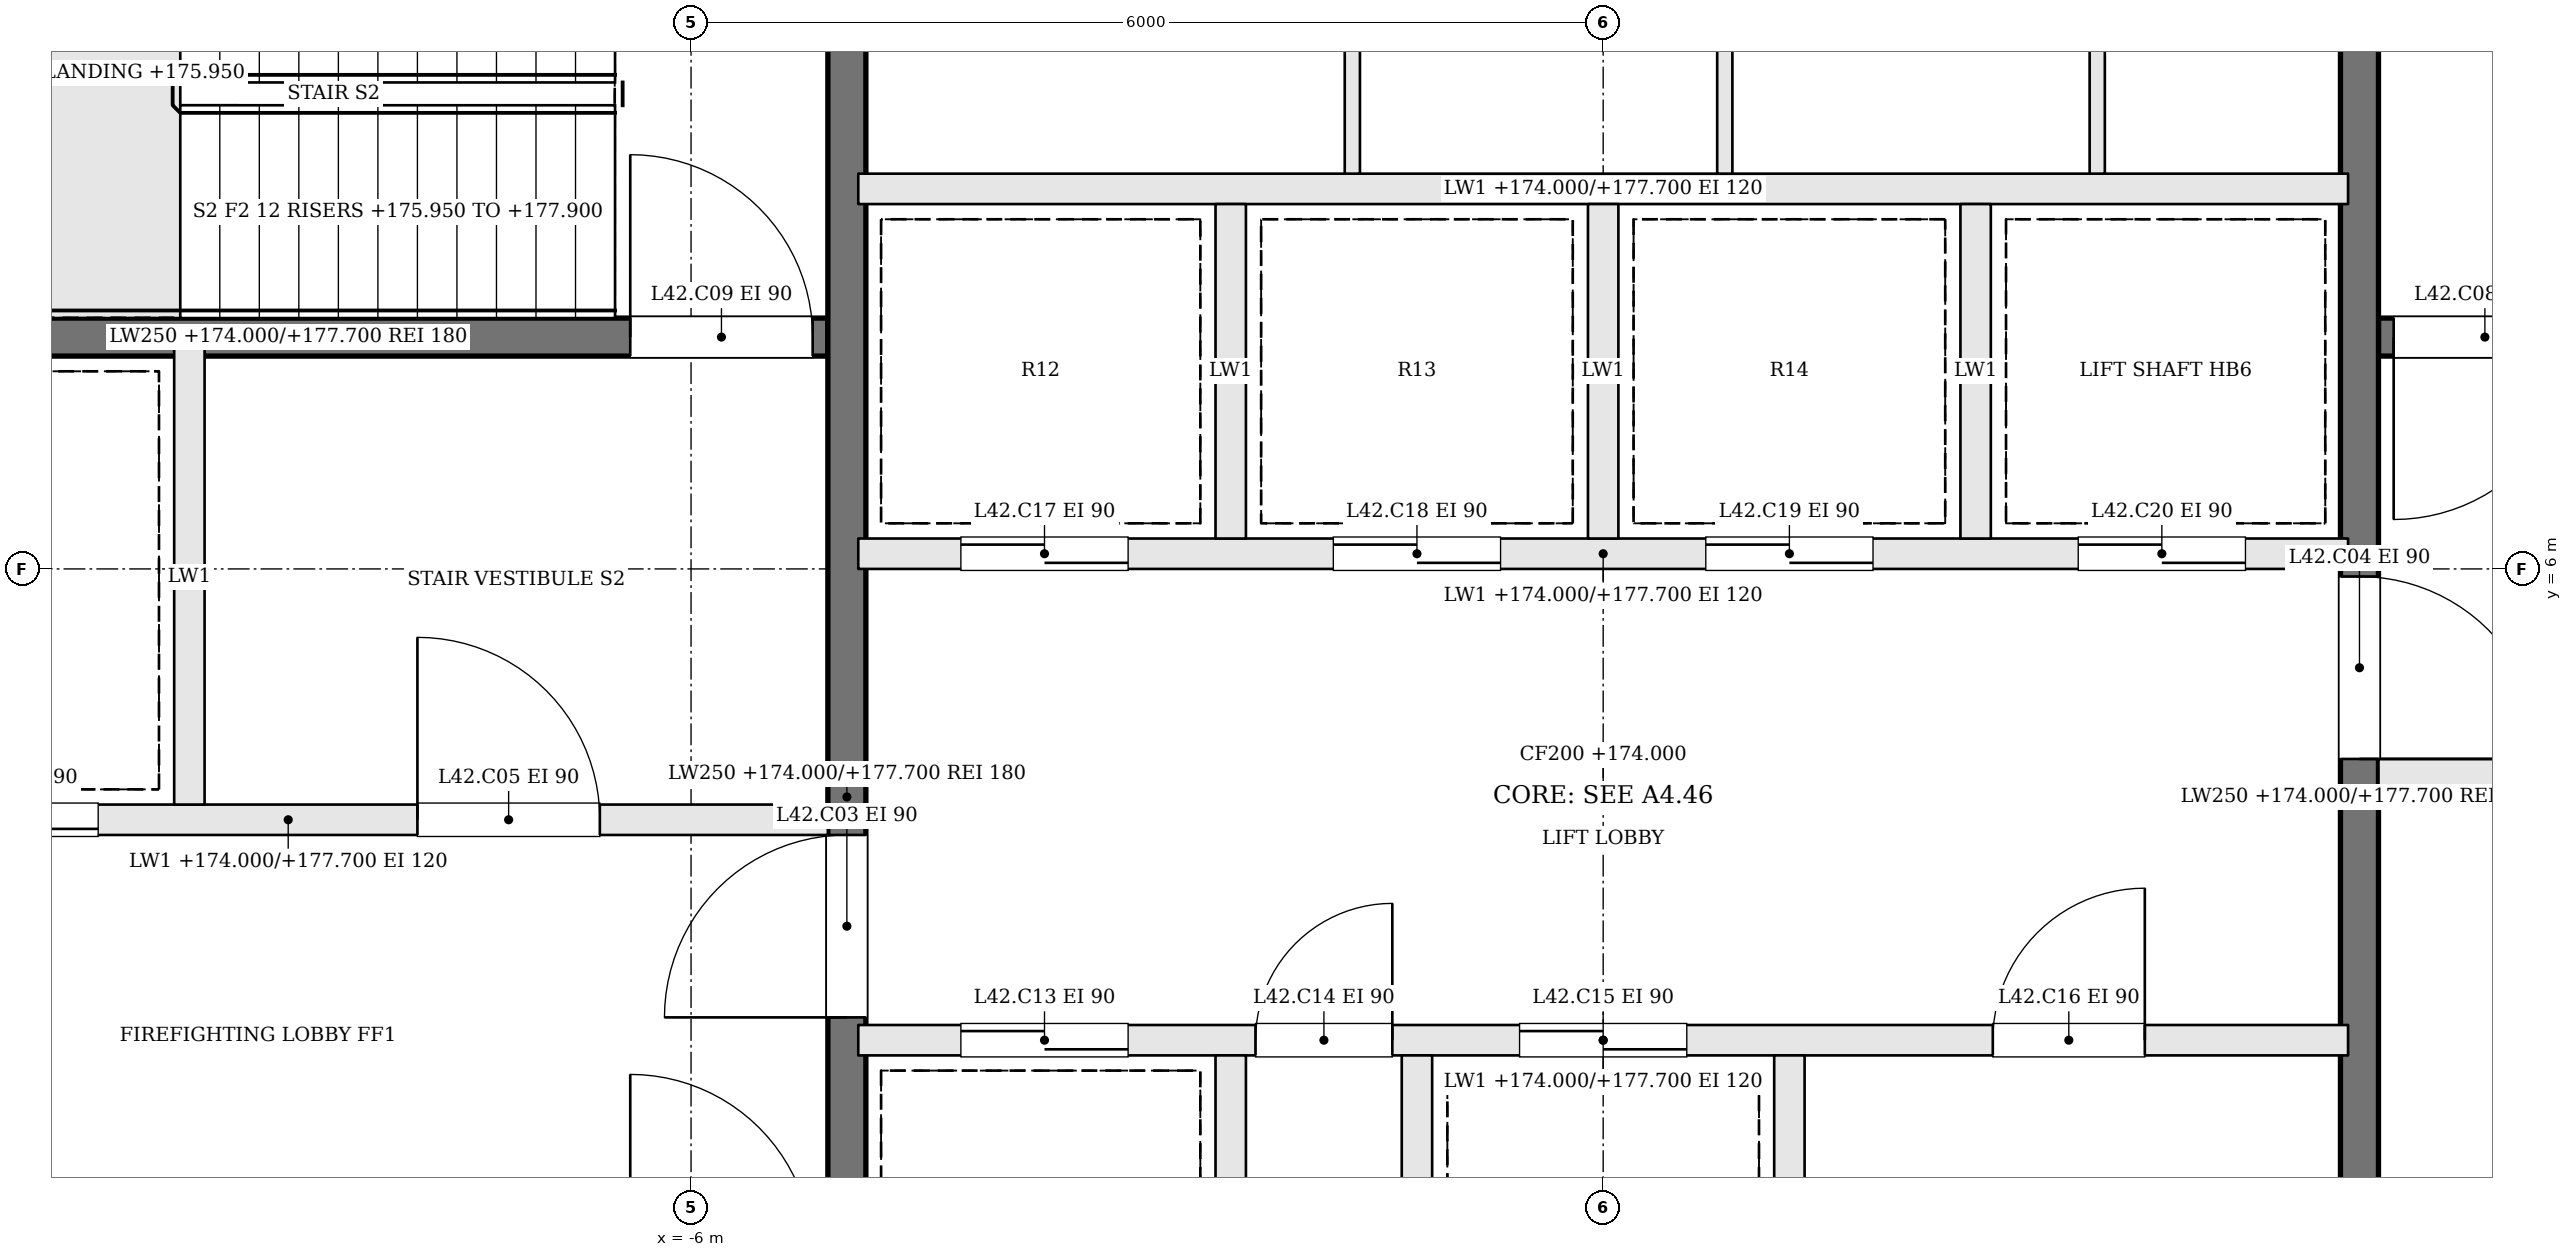
"""IFC4 building model, lengths in metres.
Left out: names, types, materials, properties, quantities, classifications, styles, units other than length and angle.
Written with IfcOpenShell. Run it as: python <this file> out.ifc"""

import sys

from ifc_helpers import new_model, si_unit, direction, frame, frame_2d, origin, place, context, subcontext, project, spatial, rectangle, extrude, element, fill, save


model = new_model("IFC4")
c1 = context("Model", 3, precision=1e-05, world=origin(), true_north=direction((0.0, 1.0)))
c2 = subcontext(c1, "Body", "Model", "MODEL_VIEW")
j1 = project(units=[si_unit("LENGTHUNIT", "METRE"), si_unit("PLANEANGLEUNIT", "RADIAN")], contexts=[c1])
p1 = place(None, origin())
s1 = spatial("IfcSite", under=j1, at=p1, CompositionType="ELEMENT")
p2 = place(p1, origin())
s2 = spatial("IfcBuilding", under=s1, at=p2, CompositionType="ELEMENT")
p3 = place(p2, frame((0.0, 0.0, 174.0)))
s3 = spatial("IfcBuildingStorey", under=s2, at=p3, CompositionType="ELEMENT", Elevation=174.0)
p4 = place(p3, frame((12.2, 7.525, 0.0), z_axis=(0.0, 0.0, 1.0), x_axis=(-1.0, 0.0, 0.0)))
e1 = element("IfcWall", 1, at=p4, inside=s3, PredefinedType="SOLIDWALL", context=c2, shape_type="SweptSolid", body=[
    extrude(rectangle(XDim=7.1, YDim=0.25, at=frame_2d((3.55, 0.0))), origin(), (0.0, 0.0, 1.0), 3.7),
])
p5 = place(p4, frame((5.8, 0.0, 0.0)))
e2 = element("IfcOpeningElement", 2, at=p5, cuts=e1, PredefinedType="OPENING", context=c2, shape_type="SweptSolid", body=[
    extrude(rectangle(XDim=1.2, YDim=2.1, at=frame_2d((0.6, 1.05))), frame((0.0, 0.135, 0.0), z_axis=(0.0, -1.0, 0.0), x_axis=(1.0, 0.0, 0.0)), (0.0, 0.0, 1.0), 0.27),
])
p6 = place(p3, frame((-12.2, 4.35, 0.0), z_axis=(0.0, 0.0, 1.0), x_axis=(1.0, 0.0, 0.0)))
e3 = element("IfcWall", 3, at=p6, inside=s3, PredefinedType="SOLIDWALL", context=c2, shape_type="SweptSolid", body=[
    extrude(rectangle(XDim=7.1, YDim=0.2, at=frame_2d((3.55, 0.0))), origin(), (0.0, 0.0, 1.0), 3.7),
])
p7 = place(p6, frame((4.4, 0.0, 0.0)))
e4 = element("IfcOpeningElement", 4, at=p7, cuts=e3, PredefinedType="OPENING", context=c2, shape_type="SweptSolid", body=[
    extrude(rectangle(XDim=1.2, YDim=2.1, at=frame_2d((0.6, 1.05))), frame((0.0, 0.11, 0.0), z_axis=(0.0, -1.0, 0.0), x_axis=(1.0, 0.0, 0.0)), (0.0, 0.0, 1.0), 0.22),
])
p8 = place(p6, frame((1.1, 0.0, 0.0)))
e5 = element("IfcOpeningElement", 5, at=p8, cuts=e3, PredefinedType="OPENING", context=c2, shape_type="SweptSolid", body=[
    extrude(rectangle(XDim=1.2, YDim=2.1, at=frame_2d((0.6, 1.05))), frame((0.0, 0.11, 0.0), z_axis=(0.0, -1.0, 0.0), x_axis=(1.0, 0.0, 0.0)), (0.0, 0.0, 1.0), 0.22),
])
p9 = place(p3, frame((12.2, 4.65, 0.0), z_axis=(0.0, 0.0, 1.0), x_axis=(-1.0, 0.0, 0.0)))
e6 = element("IfcWall", 6, at=p9, inside=s3, PredefinedType="SOLIDWALL", context=c2, shape_type="SweptSolid", body=[
    extrude(rectangle(XDim=7.1, YDim=0.2, at=frame_2d((3.55, 0.0))), origin(), (0.0, 0.0, 1.0), 3.7),
])
p10 = place(p9, frame((4.4, 0.0, 0.0)))
e7 = element("IfcOpeningElement", 7, at=p10, cuts=e6, PredefinedType="OPENING", context=c2, shape_type="SweptSolid", body=[
    extrude(rectangle(XDim=1.2, YDim=2.1, at=frame_2d((0.6, 1.05))), frame((0.0, 0.11, 0.0), z_axis=(0.0, -1.0, 0.0), x_axis=(1.0, 0.0, 0.0)), (0.0, 0.0, 1.0), 0.22),
])
p11 = place(p9, frame((1.1, 0.0, 0.0)))
e8 = element("IfcOpeningElement", 8, at=p11, cuts=e6, PredefinedType="OPENING", context=c2, shape_type="SweptSolid", body=[
    extrude(rectangle(XDim=1.2, YDim=2.1, at=frame_2d((0.6, 1.05))), frame((0.0, 0.11, 0.0), z_axis=(0.0, -1.0, 0.0), x_axis=(1.0, 0.0, 0.0)), (0.0, 0.0, 1.0), 0.22),
])
p12 = place(p3, frame((-12.2, 7.525, 0.0), z_axis=(0.0, 0.0, 1.0), x_axis=(1.0, 0.0, 0.0)))
e9 = element("IfcWall", 9, at=p12, inside=s3, PredefinedType="SOLIDWALL", context=c2, shape_type="SweptSolid", body=[
    extrude(rectangle(XDim=7.1, YDim=0.25, at=frame_2d((3.55, 0.0))), origin(), (0.0, 0.0, 1.0), 3.7),
])
p13 = place(p12, frame((5.8, 0.0, 0.0)))
e10 = element("IfcOpeningElement", 10, at=p13, cuts=e9, PredefinedType="OPENING", context=c2, shape_type="SweptSolid", body=[
    extrude(rectangle(XDim=1.2, YDim=2.1, at=frame_2d((0.6, 1.05))), frame((0.0, 0.135, 0.0), z_axis=(0.0, -1.0, 0.0), x_axis=(1.0, 0.0, 0.0)), (0.0, 0.0, 1.0), 0.27),
])
p14 = place(p3, frame((-9.3, 4.45, 0.0), z_axis=(0.0, 0.0, 1.0), x_axis=(0.0, 1.0, 0.0)))
e11 = element("IfcWall", 11, at=p14, inside=s3, PredefinedType="SOLIDWALL", context=c2, shape_type="SweptSolid", body=[
    extrude(rectangle(XDim=3.0, YDim=0.2, at=frame_2d((1.5, 0.0))), origin(), (0.0, 0.0, 1.0), 3.7),
])
p15 = place(p3, frame((-4.975, -2.2, 0.0), z_axis=(0.0, 0.0, 1.0), x_axis=(0.0, 1.0, 0.0)))
e12 = element("IfcWall", 12, at=p15, inside=s3, PredefinedType="SOLIDWALL", context=c2, shape_type="SweptSolid", body=[
    extrude(rectangle(XDim=13.4, YDim=0.25, at=frame_2d((6.7, 0.0))), origin(), (0.0, 0.0, 1.0), 3.7),
])
p16 = place(p15, frame((5.25, 0.0, 0.0)))
e13 = element("IfcOpeningElement", 13, at=p16, cuts=e12, PredefinedType="OPENING", context=c2, shape_type="SweptSolid", body=[
    extrude(rectangle(XDim=1.2, YDim=2.1, at=frame_2d((0.6, 1.05))), frame((0.0, 0.135, 0.0), z_axis=(0.0, -1.0, 0.0), x_axis=(1.0, 0.0, 0.0)), (0.0, 0.0, 1.0), 0.27),
])
p17 = place(p3, frame((4.975, 11.2, 0.0), z_axis=(0.0, 0.0, 1.0), x_axis=(0.0, -1.0, 0.0)))
e14 = element("IfcWall", 14, at=p17, inside=s3, PredefinedType="SOLIDWALL", context=c2, shape_type="SweptSolid", body=[
    extrude(rectangle(XDim=13.4, YDim=0.25, at=frame_2d((6.7, 0.0))), origin(), (0.0, 0.0, 1.0), 3.7),
])
p18 = place(p17, frame((5.25, 0.0, 0.0)))
e15 = element("IfcOpeningElement", 15, at=p18, cuts=e14, PredefinedType="OPENING", context=c2, shape_type="SweptSolid", body=[
    extrude(rectangle(XDim=1.2, YDim=2.1, at=frame_2d((0.6, 1.05))), frame((0.0, 0.135, 0.0), z_axis=(0.0, -1.0, 0.0), x_axis=(1.0, 0.0, 0.0)), (0.0, 0.0, 1.0), 0.27),
])
p19 = place(p3, frame((-4.9, 2.9, 0.0), z_axis=(0.0, 0.0, 1.0), x_axis=(1.0, 0.0, 0.0)))
e16 = element("IfcWall", 16, at=p19, inside=s3, PredefinedType="SOLIDWALL", context=c2, shape_type="SweptSolid", body=[
    extrude(rectangle(XDim=9.8, YDim=0.2, at=frame_2d((4.9, 0.0))), origin(), (0.0, 0.0, 1.0), 3.7),
])
p20 = place(p19, frame((0.675, 0.0, 0.0)))
e17 = element("IfcOpeningElement", 17, at=p20, cuts=e16, PredefinedType="OPENING", context=c2, shape_type="SweptSolid", body=[
    extrude(rectangle(XDim=1.1, YDim=2.1, at=frame_2d((0.55, 1.05))), frame((0.0, 0.11, 0.0), z_axis=(0.0, -1.0, 0.0), x_axis=(1.0, 0.0, 0.0)), (0.0, 0.0, 1.0), 0.22),
])
p21 = place(p19, frame((2.613, 0.0, 0.0)))
e18 = element("IfcOpeningElement", 18, at=p21, cuts=e16, PredefinedType="OPENING", context=c2, shape_type="SweptSolid", body=[
    extrude(rectangle(XDim=0.9, YDim=2.1, at=frame_2d((0.45, 1.05))), frame((0.0, 0.11, 0.0), z_axis=(0.0, -1.0, 0.0), x_axis=(1.0, 0.0, 0.0)), (0.0, 0.0, 1.0), 0.22),
])
p22 = place(p19, frame((4.35, 0.0, 0.0)))
e19 = element("IfcOpeningElement", 19, at=p22, cuts=e16, PredefinedType="OPENING", context=c2, shape_type="SweptSolid", body=[
    extrude(rectangle(XDim=1.1, YDim=2.1, at=frame_2d((0.55, 1.05))), frame((0.0, 0.11, 0.0), z_axis=(0.0, -1.0, 0.0), x_axis=(1.0, 0.0, 0.0)), (0.0, 0.0, 1.0), 0.22),
])
p23 = place(p19, frame((7.463, 0.0, 0.0)))
e20 = element("IfcOpeningElement", 20, at=p23, cuts=e16, PredefinedType="OPENING", context=c2, shape_type="SweptSolid", body=[
    extrude(rectangle(XDim=1.0, YDim=2.1, at=frame_2d((0.5, 1.05))), frame((0.0, 0.11, 0.0), z_axis=(0.0, -1.0, 0.0), x_axis=(1.0, 0.0, 0.0)), (0.0, 0.0, 1.0), 0.22),
])
p24 = place(p3, frame((-4.9, 6.1, 0.0), z_axis=(0.0, 0.0, 1.0), x_axis=(1.0, 0.0, 0.0)))
e21 = element("IfcWall", 21, at=p24, inside=s3, PredefinedType="SOLIDWALL", context=c2, shape_type="SweptSolid", body=[
    extrude(rectangle(XDim=9.8, YDim=0.2, at=frame_2d((4.9, 0.0))), origin(), (0.0, 0.0, 1.0), 3.7),
])
p25 = place(p24, frame((0.675, 0.0, 0.0)))
e22 = element("IfcOpeningElement", 22, at=p25, cuts=e21, PredefinedType="OPENING", context=c2, shape_type="SweptSolid", body=[
    extrude(rectangle(XDim=1.1, YDim=2.1, at=frame_2d((0.55, 1.05))), frame((0.0, 0.11, 0.0), z_axis=(0.0, -1.0, 0.0), x_axis=(1.0, 0.0, 0.0)), (0.0, 0.0, 1.0), 0.22),
])
p26 = place(p24, frame((3.125, 0.0, 0.0)))
e23 = element("IfcOpeningElement", 23, at=p26, cuts=e21, PredefinedType="OPENING", context=c2, shape_type="SweptSolid", body=[
    extrude(rectangle(XDim=1.1, YDim=2.1, at=frame_2d((0.55, 1.05))), frame((0.0, 0.11, 0.0), z_axis=(0.0, -1.0, 0.0), x_axis=(1.0, 0.0, 0.0)), (0.0, 0.0, 1.0), 0.22),
])
p27 = place(p24, frame((5.575, 0.0, 0.0)))
e24 = element("IfcOpeningElement", 24, at=p27, cuts=e21, PredefinedType="OPENING", context=c2, shape_type="SweptSolid", body=[
    extrude(rectangle(XDim=1.1, YDim=2.1, at=frame_2d((0.55, 1.05))), frame((0.0, 0.11, 0.0), z_axis=(0.0, -1.0, 0.0), x_axis=(1.0, 0.0, 0.0)), (0.0, 0.0, 1.0), 0.22),
])
p28 = place(p24, frame((8.025, 0.0, 0.0)))
e25 = element("IfcOpeningElement", 25, at=p28, cuts=e21, PredefinedType="OPENING", context=c2, shape_type="SweptSolid", body=[
    extrude(rectangle(XDim=1.1, YDim=2.1, at=frame_2d((0.55, 1.05))), frame((0.0, 0.11, 0.0), z_axis=(0.0, -1.0, 0.0), x_axis=(1.0, 0.0, 0.0)), (0.0, 0.0, 1.0), 0.22),
])
p29 = place(p3, frame((-4.9, 8.5, 0.0), z_axis=(0.0, 0.0, 1.0), x_axis=(1.0, 0.0, 0.0)))
e26 = element("IfcWall", 26, at=p29, inside=s3, PredefinedType="SOLIDWALL", context=c2, shape_type="SweptSolid", body=[
    extrude(rectangle(XDim=9.8, YDim=0.2, at=frame_2d((4.9, 0.0))), origin(), (0.0, 0.0, 1.0), 3.7),
])
for number, where, z_axis, x_axis in (
    (27, (-2.45, 0.6, 0.0), (0.0, 0.0, 1.0), (0.0, 1.0, 0.0)),
    (28, (-1.225, 0.6, 0.0), (0.0, 0.0, 1.0), (0.0, 1.0, 0.0)),
    (29, (1.225, 0.6, 0.0), (0.0, 0.0, 1.0), (0.0, 1.0, 0.0)),
    (30, (-2.45, 6.2, 0.0), (0.0, 0.0, 1.0), (0.0, 1.0, 0.0)),
    (31, (0.0, 6.2, 0.0), (0.0, 0.0, 1.0), (0.0, 1.0, 0.0)),
    (32, (2.45, 6.2, 0.0), (0.0, 0.0, 1.0), (0.0, 1.0, 0.0)),
):
    element("IfcWall", number, at=place(p3, frame(where, z_axis=z_axis, x_axis=x_axis)), inside=s3, PredefinedType="SOLIDWALL", context=c2, shape_type="SweptSolid", body=[
        extrude(rectangle(XDim=2.2, YDim=0.2, at=frame_2d((1.1, 0.0))), origin(), (0.0, 0.0, 1.0), 3.7),
    ])
for number, where, z_axis, x_axis in (
    (33, (-1.65, 8.6, 0.0), (0.0, 0.0, 1.0), (0.0, 1.0, 0.0)),
    (34, (0.8, 8.6, 0.0), (0.0, 0.0, 1.0), (0.0, 1.0, 0.0)),
    (35, (3.25, 8.6, 0.0), (0.0, 0.0, 1.0), (0.0, 1.0, 0.0)),
):
    element("IfcWall", number, at=place(p3, frame(where, z_axis=z_axis, x_axis=x_axis)), inside=s3, PredefinedType="PARTITIONING", context=c2, shape_type="SweptSolid", body=[
        extrude(rectangle(XDim=2.6, YDim=0.1, at=frame_2d((1.3, 0.0))), origin(), (0.0, 0.0, 1.0), 3.7),
    ])
p30 = place(p16, origin())
e36 = element("IfcDoor", 36, at=p30, inside=s3, OperationType="SINGLE_SWING_LEFT", PredefinedType="DOOR", context=c2, shape_type="SweptSolid", body=[
    extrude(rectangle(XDim=1.2, YDim=2.1, at=frame_2d((0.6, 1.05))), frame((0.0, 0.025, 0.0), z_axis=(0.0, -1.0, 0.0), x_axis=(1.0, 0.0, 0.0)), (0.0, 0.0, 1.0), 0.05),
])
fill(e13, e36)
p31 = place(p18, origin())
e37 = element("IfcDoor", 37, at=p31, inside=s3, OperationType="SINGLE_SWING_RIGHT", PredefinedType="DOOR", context=c2, shape_type="SweptSolid", body=[
    extrude(rectangle(XDim=1.2, YDim=2.1, at=frame_2d((0.6, 1.05))), frame((0.0, 0.025, 0.0), z_axis=(0.0, -1.0, 0.0), x_axis=(1.0, 0.0, 0.0)), (0.0, 0.0, 1.0), 0.05),
])
fill(e15, e37)
p32 = place(p7, origin())
e38 = element("IfcDoor", 38, at=p32, inside=s3, OperationType="SINGLE_SWING_LEFT", PredefinedType="DOOR", context=c2, shape_type="SweptSolid", body=[
    extrude(rectangle(XDim=1.2, YDim=2.1, at=frame_2d((0.6, 1.05))), frame((0.0, 0.025, 0.0), z_axis=(0.0, -1.0, 0.0), x_axis=(1.0, 0.0, 0.0)), (0.0, 0.0, 1.0), 0.05),
])
fill(e4, e38)
p33 = place(p5, origin())
e39 = element("IfcDoor", 39, at=p33, inside=s3, OperationType="SINGLE_SWING_RIGHT", PredefinedType="DOOR", context=c2, shape_type="SweptSolid", body=[
    extrude(rectangle(XDim=1.2, YDim=2.1, at=frame_2d((0.6, 1.05))), frame((0.0, 0.025, 0.0), z_axis=(0.0, -1.0, 0.0), x_axis=(1.0, 0.0, 0.0)), (0.0, 0.0, 1.0), 0.05),
])
fill(e2, e39)
p34 = place(p13, origin())
e40 = element("IfcDoor", 40, at=p34, inside=s3, OperationType="SINGLE_SWING_LEFT", PredefinedType="DOOR", context=c2, shape_type="SweptSolid", body=[
    extrude(rectangle(XDim=1.2, YDim=2.1, at=frame_2d((0.6, 1.05))), frame((0.0, 0.025, 0.0), z_axis=(0.0, -1.0, 0.0), x_axis=(1.0, 0.0, 0.0)), (0.0, 0.0, 1.0), 0.05),
])
fill(e10, e40)
p35 = place(p8, origin())
e41 = element("IfcDoor", 41, at=p35, inside=s3, OperationType="SLIDING_TO_RIGHT", PredefinedType="DOOR", context=c2, shape_type="SweptSolid", body=[
    extrude(rectangle(XDim=1.2, YDim=2.1, at=frame_2d((0.6, 1.05))), frame((0.0, 0.025, 0.0), z_axis=(0.0, -1.0, 0.0), x_axis=(1.0, 0.0, 0.0)), (0.0, 0.0, 1.0), 0.05),
])
fill(e5, e41)
p36 = place(p20, origin())
e42 = element("IfcDoor", 42, at=p36, inside=s3, OperationType="SLIDING_TO_RIGHT", PredefinedType="DOOR", context=c2, shape_type="SweptSolid", body=[
    extrude(rectangle(XDim=1.1, YDim=2.1, at=frame_2d((0.55, 1.05))), frame((0.0, 0.025, 0.0), z_axis=(0.0, -1.0, 0.0), x_axis=(1.0, 0.0, 0.0)), (0.0, 0.0, 1.0), 0.05),
])
fill(e17, e42)
p37 = place(p21, origin())
e43 = element("IfcDoor", 43, at=p37, inside=s3, OperationType="SINGLE_SWING_RIGHT", PredefinedType="DOOR", context=c2, shape_type="SweptSolid", body=[
    extrude(rectangle(XDim=0.9, YDim=2.1, at=frame_2d((0.45, 1.05))), frame((0.0, 0.025, 0.0), z_axis=(0.0, -1.0, 0.0), x_axis=(1.0, 0.0, 0.0)), (0.0, 0.0, 1.0), 0.05),
])
fill(e18, e43)
p38 = place(p22, origin())
e44 = element("IfcDoor", 44, at=p38, inside=s3, OperationType="SLIDING_TO_LEFT", PredefinedType="DOOR", context=c2, shape_type="SweptSolid", body=[
    extrude(rectangle(XDim=1.1, YDim=2.1, at=frame_2d((0.55, 1.05))), frame((0.0, 0.025, 0.0), z_axis=(0.0, -1.0, 0.0), x_axis=(1.0, 0.0, 0.0)), (0.0, 0.0, 1.0), 0.05),
])
fill(e19, e44)
p39 = place(p23, origin())
e45 = element("IfcDoor", 45, at=p39, inside=s3, OperationType="SINGLE_SWING_RIGHT", PredefinedType="DOOR", context=c2, shape_type="SweptSolid", body=[
    extrude(rectangle(XDim=1.0, YDim=2.1, at=frame_2d((0.5, 1.05))), frame((0.0, 0.025, 0.0), z_axis=(0.0, -1.0, 0.0), x_axis=(1.0, 0.0, 0.0)), (0.0, 0.0, 1.0), 0.05),
])
fill(e20, e45)
p40 = place(p25, origin())
e46 = element("IfcDoor", 46, at=p40, inside=s3, OperationType="SLIDING_TO_RIGHT", PredefinedType="DOOR", context=c2, shape_type="SweptSolid", body=[
    extrude(rectangle(XDim=1.1, YDim=2.1, at=frame_2d((0.55, 1.05))), frame((0.0, 0.025, 0.0), z_axis=(0.0, -1.0, 0.0), x_axis=(1.0, 0.0, 0.0)), (0.0, 0.0, 1.0), 0.05),
])
fill(e22, e46)
p41 = place(p26, origin())
e47 = element("IfcDoor", 47, at=p41, inside=s3, OperationType="SLIDING_TO_LEFT", PredefinedType="DOOR", context=c2, shape_type="SweptSolid", body=[
    extrude(rectangle(XDim=1.1, YDim=2.1, at=frame_2d((0.55, 1.05))), frame((0.0, 0.025, 0.0), z_axis=(0.0, -1.0, 0.0), x_axis=(1.0, 0.0, 0.0)), (0.0, 0.0, 1.0), 0.05),
])
fill(e23, e47)
p42 = place(p27, origin())
e48 = element("IfcDoor", 48, at=p42, inside=s3, OperationType="SLIDING_TO_RIGHT", PredefinedType="DOOR", context=c2, shape_type="SweptSolid", body=[
    extrude(rectangle(XDim=1.1, YDim=2.1, at=frame_2d((0.55, 1.05))), frame((0.0, 0.025, 0.0), z_axis=(0.0, -1.0, 0.0), x_axis=(1.0, 0.0, 0.0)), (0.0, 0.0, 1.0), 0.05),
])
fill(e24, e48)
p43 = place(p28, origin())
e49 = element("IfcDoor", 49, at=p43, inside=s3, OperationType="SLIDING_TO_LEFT", PredefinedType="DOOR", context=c2, shape_type="SweptSolid", body=[
    extrude(rectangle(XDim=1.1, YDim=2.1, at=frame_2d((0.55, 1.05))), frame((0.0, 0.025, 0.0), z_axis=(0.0, -1.0, 0.0), x_axis=(1.0, 0.0, 0.0)), (0.0, 0.0, 1.0), 0.05),
])
fill(e25, e49)
save(model, sys.argv[1])
